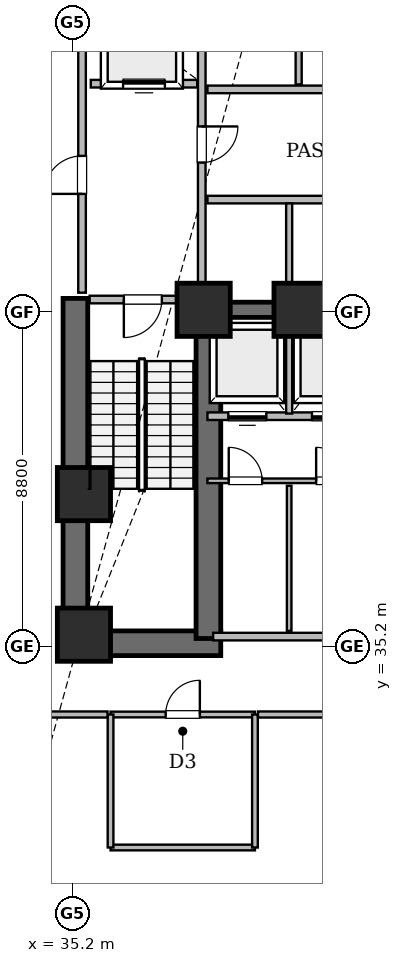
"""IFC4 building model, lengths in metres.
Left out: names, types, materials, properties, quantities, classifications, styles, units other than length and angle.
Written with IfcOpenShell. Run it as: python <this file> out.ifc"""

import sys

from ifc_helpers import new_model, si_unit, direction, frame, frame_2d, origin, origin_2d, place, context, subcontext, project, spatial, rectangle, extrude, element, fill, save


model = new_model("IFC4")
c1 = context("Model", 3, precision=1e-05, world=origin(), true_north=direction((0.0, 1.0)))
c2 = subcontext(c1, "Body", "Model", "MODEL_VIEW")
j1 = project(units=[si_unit("LENGTHUNIT", "METRE"), si_unit("PLANEANGLEUNIT", "RADIAN")], contexts=[c1])
p1 = place(None, origin())
s1 = spatial("IfcSite", under=j1, at=p1, CompositionType="ELEMENT")
p2 = place(p1, origin())
s2 = spatial("IfcBuilding", under=s1, at=p2, CompositionType="ELEMENT")
p3 = place(p2, frame((0.0, 0.0, 9.6)))
s3 = spatial("IfcBuildingStorey", under=s2, at=p3, CompositionType="ELEMENT", Elevation=9.6)
p4 = place(p3, frame((34.95, 35.275, 0.0), z_axis=(0.0, 0.0, 1.0), x_axis=(1.0, 0.0, 0.0)))
e1 = element("IfcWall", 1, at=p4, inside=s3, PredefinedType="SHEAR", context=c2, shape_type="SweptSolid", body=[
    extrude(rectangle(XDim=4.15, YDim=0.65, at=frame_2d((2.075, 0.0))), origin(), (0.0, 0.0, 1.0), 4.5),
])
p5 = place(p3, frame((35.275, 34.95, 0.0), z_axis=(0.0, 0.0, 1.0), x_axis=(0.0, 1.0, 0.0)))
e2 = element("IfcWall", 2, at=p5, inside=s3, PredefinedType="SHEAR", context=c2, shape_type="SweptSolid", body=[
    extrude(rectangle(XDim=9.4, YDim=0.65, at=frame_2d((4.7, 0.0))), origin(), (0.0, 0.0, 1.0), 4.5),
])
p6 = place(p3, frame((38.775, 35.4, 0.0), z_axis=(0.0, 0.0, 1.0), x_axis=(0.0, 1.0, 0.0)))
e3 = element("IfcWall", 3, at=p6, inside=s3, PredefinedType="SHEAR", context=c2, shape_type="SweptSolid", body=[
    extrude(rectangle(XDim=8.95, YDim=0.65, at=frame_2d((4.475, 0.0))), origin(), (0.0, 0.0, 1.0), 4.5),
])
p7 = place(p3, frame((38.75, 44.05, 0.0), z_axis=(0.0, 0.0, 1.0), x_axis=(1.0, 0.0, 0.0)))
e4 = element("IfcWall", 4, at=p7, inside=s3, PredefinedType="SHEAR", context=c2, shape_type="SweptSolid", body=[
    extrude(rectangle(XDim=4.2, YDim=0.4, at=frame_2d((2.1, 0.0))), origin(), (0.0, 0.0, 1.0), 4.5),
])
for number, where, z_axis, x_axis in (
    (5, (35.5, 35.5, 0.0), (0.0, 0.0, 1.0), (1.0, 0.0, 0.0)),
    (6, (38.65, 44.05, 0.0), (0.0, 0.0, 1.0), (1.0, 0.0, 0.0)),
    (7, (35.5, 39.2, 0.0), (0.0, 0.0, 1.0), (1.0, 0.0, 0.0)),
    (8, (41.2, 44.05, 0.0), (0.0, 0.0, 1.0), (1.0, 0.0, 0.0)),
):
    element("IfcColumn", number, at=place(p3, frame(where, z_axis=z_axis, x_axis=x_axis)), inside=s3, PredefinedType="COLUMN", context=c2, shape_type="SweptSolid", body=[
        extrude(rectangle(XDim=1.4, YDim=1.4, at=origin_2d()), origin(), (0.0, 0.0, 1.0), 4.8),
    ])
p8 = place(p3, frame((38.9, 35.45, 0.0), z_axis=(0.0, 0.0, 1.0), x_axis=(1.0, 0.0, 0.0)))
e9 = element("IfcWall", 9, at=p8, inside=s3, PredefinedType="SOLIDWALL", context=c2, shape_type="SweptSolid", body=[
    extrude(rectangle(XDim=10.2, YDim=0.2, at=frame_2d((5.1, 0.0))), origin(), (0.0, 0.0, 1.0), 4.5),
])
p9 = place(p8, frame((4.6, 0.0, 0.0)))
e10 = element("IfcOpeningElement", 10, at=p9, cuts=e9, PredefinedType="OPENING", context=c2, shape_type="SweptSolid", body=[
    extrude(rectangle(XDim=1.0, YDim=2.15, at=frame_2d((0.5, 1.075))), frame((0.0, 0.11, 0.0), z_axis=(0.0, -1.0, 0.0), x_axis=(1.0, 0.0, 0.0)), (0.0, 0.0, 1.0), 0.22),
])
p10 = place(p3, frame((35.45, 44.5, 0.0), z_axis=(0.0, 0.0, 1.0), x_axis=(0.0, 1.0, 0.0)))
e11 = element("IfcWall", 11, at=p10, inside=s3, PredefinedType="SOLIDWALL", context=c2, shape_type="SweptSolid", body=[
    extrude(rectangle(XDim=7.92, YDim=0.2, at=frame_2d((3.96, 0.0))), origin(), (0.0, 0.0, 1.0), 4.5),
])
p11 = place(p10, frame((2.6, 0.0, 0.0)))
e12 = element("IfcOpeningElement", 12, at=p11, cuts=e11, PredefinedType="OPENING", context=c2, shape_type="SweptSolid", body=[
    extrude(rectangle(XDim=1.0, YDim=2.15, at=frame_2d((0.5, 1.075))), frame((0.0, 0.11, 0.0), z_axis=(0.0, -1.0, 0.0), x_axis=(1.0, 0.0, 0.0)), (0.0, 0.0, 1.0), 0.22),
])
p12 = place(p3, frame((38.6, 44.5, 0.0), z_axis=(0.0, 0.0, 1.0), x_axis=(0.0, 1.0, 0.0)))
e13 = element("IfcWall", 13, at=p12, inside=s3, PredefinedType="SOLIDWALL", context=c2, shape_type="SweptSolid", body=[
    extrude(rectangle(XDim=7.92, YDim=0.2, at=frame_2d((3.96, 0.0))), origin(), (0.0, 0.0, 1.0), 4.5),
])
p13 = place(p12, frame((3.425, 0.0, 0.0)))
e14 = element("IfcOpeningElement", 14, at=p13, cuts=e13, PredefinedType="OPENING", context=c2, shape_type="SweptSolid", body=[
    extrude(rectangle(XDim=0.95, YDim=2.15, at=frame_2d((0.475, 1.075))), frame((0.0, 0.11, 0.0), z_axis=(0.0, -1.0, 0.0), x_axis=(1.0, 0.0, 0.0)), (0.0, 0.0, 1.0), 0.22),
])
p14 = place(p3, frame((38.75, 41.25, 0.0), z_axis=(0.0, 0.0, 1.0), x_axis=(1.0, 0.0, 0.0)))
e15 = element("IfcWall", 15, at=p14, inside=s3, PredefinedType="SOLIDWALL", context=c2, shape_type="SweptSolid", body=[
    extrude(rectangle(XDim=4.33, YDim=0.2, at=frame_2d((2.165, 0.0))), origin(), (0.0, 0.0, 1.0), 4.5),
])
p15 = place(p14, frame((0.55, 0.0, 0.0)))
e16 = element("IfcOpeningElement", 16, at=p15, cuts=e15, PredefinedType="OPENING", context=c2, shape_type="SweptSolid", body=[
    extrude(rectangle(XDim=1.0, YDim=2.15, at=frame_2d((0.5, 1.075))), frame((0.0, 0.11, 0.0), z_axis=(0.0, -1.0, 0.0), x_axis=(1.0, 0.0, 0.0)), (0.0, 0.0, 1.0), 0.22),
])
p16 = place(p14, frame((2.75, 0.0, 0.0)))
e17 = element("IfcOpeningElement", 17, at=p16, cuts=e15, PredefinedType="OPENING", context=c2, shape_type="SweptSolid", body=[
    extrude(rectangle(XDim=1.0, YDim=2.15, at=frame_2d((0.5, 1.075))), frame((0.0, 0.11, 0.0), z_axis=(0.0, -1.0, 0.0), x_axis=(1.0, 0.0, 0.0)), (0.0, 0.0, 1.0), 0.22),
])
p17 = place(p3, frame((38.75, 39.55, 0.0), z_axis=(0.0, 0.0, 1.0), x_axis=(1.0, 0.0, 0.0)))
e18 = element("IfcWall", 18, at=p17, inside=s3, PredefinedType="PARTITIONING", context=c2, shape_type="SweptSolid", body=[
    extrude(rectangle(XDim=4.33, YDim=0.12, at=frame_2d((2.165, 0.0))), origin(), (0.0, 0.0, 1.0), 4.5),
])
p18 = place(p17, frame((0.56, 0.0, 0.0)))
e19 = element("IfcOpeningElement", 19, at=p18, cuts=e18, PredefinedType="OPENING", context=c2, shape_type="SweptSolid", body=[
    extrude(rectangle(XDim=0.88, YDim=2.1, at=frame_2d((0.44, 1.05))), frame((0.0, 0.07, 0.0), z_axis=(0.0, -1.0, 0.0), x_axis=(1.0, 0.0, 0.0)), (0.0, 0.0, 1.0), 0.14),
])
p19 = place(p17, frame((2.86, 0.0, 0.0)))
e20 = element("IfcOpeningElement", 20, at=p19, cuts=e18, PredefinedType="OPENING", context=c2, shape_type="SweptSolid", body=[
    extrude(rectangle(XDim=0.88, YDim=2.1, at=frame_2d((0.44, 1.05))), frame((0.0, 0.07, 0.0), z_axis=(0.0, -1.0, 0.0), x_axis=(1.0, 0.0, 0.0)), (0.0, 0.0, 1.0), 0.14),
])
p20 = place(p3, frame((36.2, 33.4, 0.0), z_axis=(0.0, 0.0, 1.0), x_axis=(1.0, 0.0, 0.0)))
e21 = element("IfcWall", 21, at=p20, inside=s3, PredefinedType="PLUMBINGWALL", context=c2, shape_type="SweptSolid", body=[
    extrude(rectangle(XDim=3.8, YDim=0.15, at=frame_2d((1.9, 0.0))), origin(), (0.0, 0.0, 1.0), 3.588),
])
p21 = place(p20, frame((1.45, 0.0, 0.0)))
e22 = element("IfcOpeningElement", 22, at=p21, cuts=e21, PredefinedType="OPENING", context=c2, shape_type="SweptSolid", body=[
    extrude(rectangle(XDim=0.9, YDim=2.1, at=frame_2d((0.45, 1.05))), frame((0.0, 0.085, 0.0), z_axis=(0.0, -1.0, 0.0), x_axis=(1.0, 0.0, 0.0)), (0.0, 0.0, 1.0), 0.17),
])
p22 = place(p3, frame((35.65, 44.32, 0.0), z_axis=(0.0, 0.0, 1.0), x_axis=(1.0, 0.0, 0.0)))
e23 = element("IfcWall", 23, at=p22, inside=s3, PredefinedType="SOLIDWALL", context=c2, shape_type="SweptSolid", body=[
    extrude(rectangle(XDim=2.8, YDim=0.2, at=frame_2d((1.4, 0.0))), origin(), (0.0, 0.0, 1.0), 4.5),
])
p23 = place(p22, frame((0.9, 0.0, 0.0)))
e24 = element("IfcOpeningElement", 24, at=p23, cuts=e23, PredefinedType="OPENING", context=c2, shape_type="SweptSolid", body=[
    extrude(rectangle(XDim=1.0, YDim=2.15, at=frame_2d((0.5, 1.075))), frame((0.0, 0.11, 0.0), z_axis=(0.0, -1.0, 0.0), x_axis=(1.0, 0.0, 0.0)), (0.0, 0.0, 1.0), 0.22),
])
p24 = place(p3, frame((35.68, 50.0, 0.0), z_axis=(0.0, 0.0, 1.0), x_axis=(1.0, 0.0, 0.0)))
e25 = element("IfcWall", 25, at=p24, inside=s3, PredefinedType="SOLIDWALL", context=c2, shape_type="SweptSolid", body=[
    extrude(rectangle(XDim=2.8, YDim=0.2, at=frame_2d((1.4, 0.0))), origin(), (0.0, 0.0, 1.0), 4.5),
])
p25 = place(p24, frame((0.85, 0.0, 0.0)))
e26 = element("IfcOpeningElement", 26, at=p25, cuts=e25, PredefinedType="OPENING", context=c2, shape_type="SweptSolid", body=[
    extrude(rectangle(XDim=1.1, YDim=2.15, at=frame_2d((0.55, 1.075))), frame((0.0, 0.11, 0.0), z_axis=(0.0, -1.0, 0.0), x_axis=(1.0, 0.0, 0.0)), (0.0, 0.0, 1.0), 0.22),
])
p26 = place(p3, frame((38.75, 49.85, 0.0), z_axis=(0.0, 0.0, 1.0), x_axis=(1.0, 0.0, 0.0)))
e27 = element("IfcWall", 27, at=p26, inside=s3, PredefinedType="SOLIDWALL", context=c2, shape_type="SweptSolid", body=[
    extrude(rectangle(XDim=5.0, YDim=0.2, at=frame_2d((2.5, 0.0))), origin(), (0.0, 0.0, 1.0), 4.5),
])
p27 = place(p3, frame((38.75, 46.95, 0.0), z_axis=(0.0, 0.0, 1.0), x_axis=(1.0, 0.0, 0.0)))
e28 = element("IfcWall", 28, at=p27, inside=s3, PredefinedType="SOLIDWALL", context=c2, shape_type="SweptSolid", body=[
    extrude(rectangle(XDim=4.33, YDim=0.2, at=frame_2d((2.165, 0.0))), origin(), (0.0, 0.0, 1.0), 4.5),
])
p28 = place(p3, frame((40.9, 35.6, 0.0), z_axis=(0.0, 0.0, 1.0), x_axis=(0.0, 1.0, 0.0)))
e29 = element("IfcWall", 29, at=p28, inside=s3, PredefinedType="PARTITIONING", context=c2, shape_type="SweptSolid", body=[
    extrude(rectangle(XDim=3.82, YDim=0.12, at=frame_2d((1.91, 0.0))), origin(), (0.0, 0.0, 1.0), 4.5),
])
p29 = place(p3, frame((36.2, 29.9, 0.0), z_axis=(0.0, 0.0, 1.0), x_axis=(1.0, 0.0, 0.0)))
e30 = element("IfcWall", 30, at=p29, inside=s3, PredefinedType="PLUMBINGWALL", context=c2, shape_type="SweptSolid", body=[
    extrude(rectangle(XDim=3.8, YDim=0.15, at=frame_2d((1.9, 0.0))), origin(), (0.0, 0.0, 1.0), 4.5),
])
for number, where, z_axis, x_axis in (
    (31, (36.2, 33.4, 0.0), (0.0, 0.0, 1.0), (0.0, -1.0, 0.0)),
    (32, (40.0, 29.9, 0.0), (0.0, 0.0, 1.0), (0.0, 1.0, 0.0)),
):
    element("IfcWall", number, at=place(p3, frame(where, z_axis=z_axis, x_axis=x_axis)), inside=s3, PredefinedType="PLUMBINGWALL", context=c2, shape_type="SweptSolid", body=[
        extrude(rectangle(XDim=3.5, YDim=0.15, at=frame_2d((1.75, 0.0))), origin(), (0.0, 0.0, 1.0), 3.588),
    ])
p30 = place(p3, frame((33.48, 33.4, 0.0), z_axis=(0.0, 0.0, 1.0), x_axis=(1.0, 0.0, 0.0)))
e33 = element("IfcWall", 33, at=p30, inside=s3, PredefinedType="SOLIDWALL", context=c2, shape_type="SweptSolid", body=[
    extrude(rectangle(XDim=2.64, YDim=0.16, at=frame_2d((1.32, 0.0))), origin(), (0.0, 0.0, 1.0), 3.588),
])
p31 = place(p3, frame((40.9, 44.3, 0.0), z_axis=(0.0, 0.0, 1.0), x_axis=(0.0, 1.0, 0.0)))
e34 = element("IfcWall", 34, at=p31, inside=s3, PredefinedType="SOLIDWALL", context=c2, shape_type="SweptSolid", body=[
    extrude(rectangle(XDim=2.55, YDim=0.16, at=frame_2d((1.275, 0.0))), origin(), (0.0, 0.0, 1.0), 4.5),
])
p32 = place(p3, frame((40.9, 41.32, 0.0), z_axis=(0.0, 0.0, 1.0), x_axis=(0.0, 1.0, 0.0)))
e35 = element("IfcWall", 35, at=p32, inside=s3, PredefinedType="SOLIDWALL", context=c2, shape_type="SweptSolid", body=[
    extrude(rectangle(XDim=2.53, YDim=0.16, at=frame_2d((1.265, 0.0))), origin(), (0.0, 0.0, 1.0), 4.5),
])
p33 = place(p3, frame((41.15, 49.98, 0.0), z_axis=(0.0, 0.0, 1.0), x_axis=(0.0, 1.0, 0.0)))
e36 = element("IfcWall", 36, at=p33, inside=s3, PredefinedType="SOLIDWALL", context=c2, shape_type="SweptSolid", body=[
    extrude(rectangle(XDim=2.37, YDim=0.16, at=frame_2d((1.185, 0.0))), origin(), (0.0, 0.0, 1.0), 4.5),
])
p34 = place(p3, frame((40.08, 33.4, 0.0), z_axis=(0.0, 0.0, 1.0), x_axis=(1.0, 0.0, 0.0)))
e37 = element("IfcWall", 37, at=p34, inside=s3, PredefinedType="SOLIDWALL", context=c2, shape_type="SweptSolid", body=[
    extrude(rectangle(XDim=1.84, YDim=0.16, at=frame_2d((0.92, 0.0))), origin(), (0.0, 0.0, 1.0), 4.5),
])
p35 = place(p23, frame((1.0, 0.0, 0.0), z_axis=(0.0, 0.0, 1.0), x_axis=(-1.0, 0.0, 0.0)))
e38 = element("IfcDoor", 38, at=p35, inside=s3, OperationType="SINGLE_SWING_LEFT", PredefinedType="DOOR", context=c2, shape_type="SweptSolid", body=[
    extrude(rectangle(XDim=1.0, YDim=2.15, at=frame_2d((0.5, 1.075))), frame((0.0, 0.025, 0.0), z_axis=(0.0, -1.0, 0.0), x_axis=(1.0, 0.0, 0.0)), (0.0, 0.0, 1.0), 0.05),
])
fill(e24, e38)
p36 = place(p11, origin())
e39 = element("IfcDoor", 39, at=p36, inside=s3, OperationType="SINGLE_SWING_LEFT", PredefinedType="DOOR", context=c2, shape_type="SweptSolid", body=[
    extrude(rectangle(XDim=1.0, YDim=2.15, at=frame_2d((0.5, 1.075))), frame((0.0, 0.025, 0.0), z_axis=(0.0, -1.0, 0.0), x_axis=(1.0, 0.0, 0.0)), (0.0, 0.0, 1.0), 0.05),
])
fill(e12, e39)
p37 = place(p13, frame((0.95, 0.0, 0.0), z_axis=(0.0, 0.0, 1.0), x_axis=(-1.0, 0.0, 0.0)))
e40 = element("IfcDoor", 40, at=p37, inside=s3, OperationType="SINGLE_SWING_RIGHT", PredefinedType="DOOR", context=c2, shape_type="SweptSolid", body=[
    extrude(rectangle(XDim=0.95, YDim=2.15, at=frame_2d((0.475, 1.075))), frame((0.0, 0.025, 0.0), z_axis=(0.0, -1.0, 0.0), x_axis=(1.0, 0.0, 0.0)), (0.0, 0.0, 1.0), 0.05),
])
fill(e14, e40)
p38 = place(p25, origin())
e41 = element("IfcDoor", 41, at=p38, inside=s3, OperationType="SLIDING_TO_LEFT", PredefinedType="DOOR", context=c2, shape_type="SweptSolid", body=[
    extrude(rectangle(XDim=1.1, YDim=2.15, at=frame_2d((0.55, 1.075))), frame((0.0, 0.025, 0.0), z_axis=(0.0, -1.0, 0.0), x_axis=(1.0, 0.0, 0.0)), (0.0, 0.0, 1.0), 0.05),
])
fill(e26, e41)
p39 = place(p15, frame((1.0, 0.0, 0.0), z_axis=(0.0, 0.0, 1.0), x_axis=(-1.0, 0.0, 0.0)))
e42 = element("IfcDoor", 42, at=p39, inside=s3, OperationType="SLIDING_TO_LEFT", PredefinedType="DOOR", context=c2, shape_type="SweptSolid", body=[
    extrude(rectangle(XDim=1.0, YDim=2.15, at=frame_2d((0.5, 1.075))), frame((0.0, 0.025, 0.0), z_axis=(0.0, -1.0, 0.0), x_axis=(1.0, 0.0, 0.0)), (0.0, 0.0, 1.0), 0.05),
])
fill(e16, e42)
p40 = place(p16, frame((1.0, 0.0, 0.0), z_axis=(0.0, 0.0, 1.0), x_axis=(-1.0, 0.0, 0.0)))
e43 = element("IfcDoor", 43, at=p40, inside=s3, OperationType="SLIDING_TO_LEFT", PredefinedType="DOOR", context=c2, shape_type="SweptSolid", body=[
    extrude(rectangle(XDim=1.0, YDim=2.15, at=frame_2d((0.5, 1.075))), frame((0.0, 0.025, 0.0), z_axis=(0.0, -1.0, 0.0), x_axis=(1.0, 0.0, 0.0)), (0.0, 0.0, 1.0), 0.05),
])
fill(e17, e43)
p41 = place(p18, origin())
e44 = element("IfcDoor", 44, at=p41, inside=s3, OperationType="SINGLE_SWING_LEFT", PredefinedType="DOOR", context=c2, shape_type="SweptSolid", body=[
    extrude(rectangle(XDim=0.88, YDim=2.1, at=frame_2d((0.44, 1.05))), frame((0.0, 0.025, 0.0), z_axis=(0.0, -1.0, 0.0), x_axis=(1.0, 0.0, 0.0)), (0.0, 0.0, 1.0), 0.05),
])
fill(e19, e44)
p42 = place(p19, origin())
e45 = element("IfcDoor", 45, at=p42, inside=s3, OperationType="SINGLE_SWING_LEFT", PredefinedType="DOOR", context=c2, shape_type="SweptSolid", body=[
    extrude(rectangle(XDim=0.88, YDim=2.1, at=frame_2d((0.44, 1.05))), frame((0.0, 0.025, 0.0), z_axis=(0.0, -1.0, 0.0), x_axis=(1.0, 0.0, 0.0)), (0.0, 0.0, 1.0), 0.05),
])
fill(e20, e45)
p43 = place(p21, origin())
e46 = element("IfcDoor", 46, at=p43, inside=s3, OperationType="SINGLE_SWING_RIGHT", PredefinedType="DOOR", context=c2, shape_type="SweptSolid", body=[
    extrude(rectangle(XDim=0.9, YDim=2.1, at=frame_2d((0.45, 1.05))), frame((0.0, 0.025, 0.0), z_axis=(0.0, -1.0, 0.0), x_axis=(1.0, 0.0, 0.0)), (0.0, 0.0, 1.0), 0.05),
])
fill(e22, e46)
save(model, sys.argv[1])
